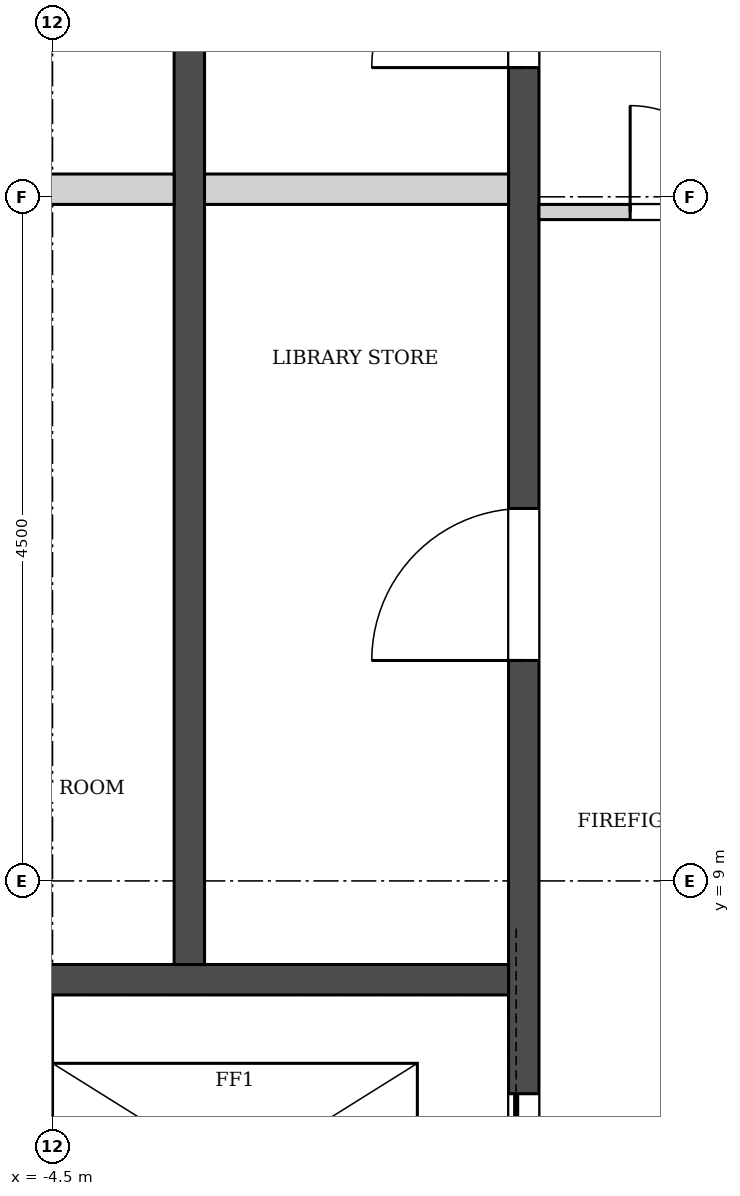
"""IFC4 building model, lengths in metres.
Left out: names, types, materials, properties, quantities, classifications, styles, units other than length and angle.
Written with IfcOpenShell. Run it as: python <this file> out.ifc"""

import sys

from ifc_helpers import new_model, si_unit, direction, frame, frame_2d, origin, place, context, subcontext, project, spatial, rectangle, extrude, element, fill, save


model = new_model("IFC4")
c1 = context("Model", 3, precision=1e-05, world=origin(), true_north=direction((0.0, 1.0)))
c2 = subcontext(c1, "Body", "Model", "MODEL_VIEW")
j1 = project(units=[si_unit("LENGTHUNIT", "METRE"), si_unit("PLANEANGLEUNIT", "RADIAN")], contexts=[c1])
p1 = place(None, origin())
s1 = spatial("IfcSite", under=j1, at=p1, CompositionType="ELEMENT")
p2 = place(p1, origin())
s2 = spatial("IfcBuilding", under=s1, at=p2, CompositionType="ELEMENT")
p3 = place(p2, frame((0.0, 0.0, 335.1)))
s3 = spatial("IfcBuildingStorey", under=s2, at=p3, CompositionType="ELEMENT", Elevation=335.1)
p4 = place(p3, frame((-4.353, 41.372, 0.0), z_axis=(0.0, 0.0, 1.0), x_axis=(-0.500001731347, -0.866024404189, 0.0)))
e1 = element("IfcWall", 1, at=p4, inside=s3, PredefinedType="SOLIDWALL", context=c2, shape_type="SweptSolid", body=[
    extrude(rectangle(XDim=38.87, YDim=0.34, at=frame_2d((19.435, 0.0))), origin(), (0.0, 0.0, 1.0), 3.8),
])
p5 = place(p4, frame((3.653, 0.0, 0.9)))
e2 = element("IfcOpeningElement", 2, at=p5, cuts=e1, PredefinedType="OPENING", context=c2, shape_type="SweptSolid", body=[
    extrude(rectangle(XDim=1.885, YDim=2.6, at=frame_2d((0.942, 1.3))), frame((0.0, 0.18, 0.0), z_axis=(0.0, -1.0, 0.0), x_axis=(1.0, 0.0, 0.0)), (0.0, 0.0, 1.0), 0.36),
])
p6 = place(p4, frame((6.653, 0.0, 0.9)))
e3 = element("IfcOpeningElement", 3, at=p6, cuts=e1, PredefinedType="OPENING", context=c2, shape_type="SweptSolid", body=[
    extrude(rectangle(XDim=1.885, YDim=2.6, at=frame_2d((0.942, 1.3))), frame((0.0, 0.18, 0.0), z_axis=(0.0, -1.0, 0.0), x_axis=(1.0, 0.0, 0.0)), (0.0, 0.0, 1.0), 0.36),
])
p7 = place(p4, frame((9.653, 0.0, 0.9)))
e4 = element("IfcOpeningElement", 4, at=p7, cuts=e1, PredefinedType="OPENING", context=c2, shape_type="SweptSolid", body=[
    extrude(rectangle(XDim=1.885, YDim=2.6, at=frame_2d((0.942, 1.3))), frame((0.0, 0.18, 0.0), z_axis=(0.0, -1.0, 0.0), x_axis=(1.0, 0.0, 0.0)), (0.0, 0.0, 1.0), 0.36),
])
p8 = place(p4, frame((12.653, 0.0, 0.9)))
e5 = element("IfcOpeningElement", 5, at=p8, cuts=e1, PredefinedType="OPENING", context=c2, shape_type="SweptSolid", body=[
    extrude(rectangle(XDim=1.885, YDim=2.6, at=frame_2d((0.942, 1.3))), frame((0.0, 0.18, 0.0), z_axis=(0.0, -1.0, 0.0), x_axis=(1.0, 0.0, 0.0)), (0.0, 0.0, 1.0), 0.36),
])
p9 = place(p4, frame((15.653, 0.0, 0.9)))
e6 = element("IfcOpeningElement", 6, at=p9, cuts=e1, PredefinedType="OPENING", context=c2, shape_type="SweptSolid", body=[
    extrude(rectangle(XDim=1.885, YDim=2.6, at=frame_2d((0.942, 1.3))), frame((0.0, 0.18, 0.0), z_axis=(0.0, -1.0, 0.0), x_axis=(1.0, 0.0, 0.0)), (0.0, 0.0, 1.0), 0.36),
])
p10 = place(p4, frame((18.653, 0.0, 0.9)))
e7 = element("IfcOpeningElement", 7, at=p10, cuts=e1, PredefinedType="OPENING", context=c2, shape_type="SweptSolid", body=[
    extrude(rectangle(XDim=1.885, YDim=2.6, at=frame_2d((0.942, 1.3))), frame((0.0, 0.18, 0.0), z_axis=(0.0, -1.0, 0.0), x_axis=(1.0, 0.0, 0.0)), (0.0, 0.0, 1.0), 0.36),
])
p11 = place(p4, frame((21.653, 0.0, 0.9)))
e8 = element("IfcOpeningElement", 8, at=p11, cuts=e1, PredefinedType="OPENING", context=c2, shape_type="SweptSolid", body=[
    extrude(rectangle(XDim=1.885, YDim=2.6, at=frame_2d((0.942, 1.3))), frame((0.0, 0.18, 0.0), z_axis=(0.0, -1.0, 0.0), x_axis=(1.0, 0.0, 0.0)), (0.0, 0.0, 1.0), 0.36),
])
p12 = place(p4, frame((24.653, 0.0, 0.9)))
e9 = element("IfcOpeningElement", 9, at=p12, cuts=e1, PredefinedType="OPENING", context=c2, shape_type="SweptSolid", body=[
    extrude(rectangle(XDim=1.885, YDim=2.6, at=frame_2d((0.942, 1.3))), frame((0.0, 0.18, 0.0), z_axis=(0.0, -1.0, 0.0), x_axis=(1.0, 0.0, 0.0)), (0.0, 0.0, 1.0), 0.36),
])
p13 = place(p4, frame((27.653, 0.0, 0.9)))
e10 = element("IfcOpeningElement", 10, at=p13, cuts=e1, PredefinedType="OPENING", context=c2, shape_type="SweptSolid", body=[
    extrude(rectangle(XDim=1.885, YDim=2.6, at=frame_2d((0.942, 1.3))), frame((0.0, 0.18, 0.0), z_axis=(0.0, -1.0, 0.0), x_axis=(1.0, 0.0, 0.0)), (0.0, 0.0, 1.0), 0.36),
])
p14 = place(p4, frame((30.653, 0.0, 0.9)))
e11 = element("IfcOpeningElement", 11, at=p14, cuts=e1, PredefinedType="OPENING", context=c2, shape_type="SweptSolid", body=[
    extrude(rectangle(XDim=1.885, YDim=2.6, at=frame_2d((0.942, 1.3))), frame((0.0, 0.18, 0.0), z_axis=(0.0, -1.0, 0.0), x_axis=(1.0, 0.0, 0.0)), (0.0, 0.0, 1.0), 0.36),
])
p15 = place(p4, frame((33.653, 0.0, 0.9)))
e12 = element("IfcOpeningElement", 12, at=p15, cuts=e1, PredefinedType="OPENING", context=c2, shape_type="SweptSolid", body=[
    extrude(rectangle(XDim=1.885, YDim=2.6, at=frame_2d((0.942, 1.3))), frame((0.0, 0.18, 0.0), z_axis=(0.0, -1.0, 0.0), x_axis=(1.0, 0.0, 0.0)), (0.0, 0.0, 1.0), 0.36),
])
p16 = place(p4, frame((1.269, 0.0, 0.9)))
e13 = element("IfcOpeningElement", 13, at=p16, cuts=e1, PredefinedType="OPENING", context=c2, shape_type="SweptSolid", body=[
    extrude(rectangle(XDim=1.115, YDim=2.4, at=frame_2d((0.558, 1.2))), frame((0.0, 0.18, 0.0), z_axis=(0.0, -1.0, 0.0), x_axis=(1.0, 0.0, 0.0)), (0.0, 0.0, 1.0), 0.36),
])
p17 = place(p4, frame((36.646, 0.0, 0.9)))
e14 = element("IfcOpeningElement", 14, at=p17, cuts=e1, PredefinedType="OPENING", context=c2, shape_type="SweptSolid", body=[
    extrude(rectangle(XDim=1.115, YDim=2.4, at=frame_2d((0.558, 1.2))), frame((0.0, 0.18, 0.0), z_axis=(0.0, -1.0, 0.0), x_axis=(1.0, 0.0, 0.0)), (0.0, 0.0, 1.0), 0.36),
])
p18 = place(p3, frame((-3.6, 8.45, -0.4), z_axis=(0.0, 0.0, 1.0), x_axis=(0.0, 1.0, 0.0)))
e15 = element("IfcWall", 15, at=p18, inside=s3, PredefinedType="SOLIDWALL", context=c2, shape_type="SweptSolid", body=[
    extrude(rectangle(XDim=7.8, YDim=0.2, at=frame_2d((3.9, 0.0))), origin(), (0.0, 0.0, 1.0), 4.2),
])
p19 = place(p3, frame((-1.4, 5.85, -0.4), z_axis=(0.0, 0.0, 1.0), x_axis=(0.0, 1.0, 0.0)))
e16 = element("IfcWall", 16, at=p19, inside=s3, PredefinedType="SOLIDWALL", context=c2, shape_type="SweptSolid", body=[
    extrude(rectangle(XDim=11.75, YDim=0.2, at=frame_2d((5.875, 0.0))), origin(), (0.0, 0.0, 1.0), 4.2),
])
p20 = place(p19, frame((0.65, 0.0, 0.4)))
e17 = element("IfcOpeningElement", 17, at=p20, cuts=e16, PredefinedType="OPENING", context=c2, shape_type="SweptSolid", body=[
    extrude(rectangle(XDim=1.1, YDim=2.1, at=frame_2d((0.55, 1.05))), frame((0.0, 0.11, 0.0), z_axis=(0.0, -1.0, 0.0), x_axis=(1.0, 0.0, 0.0)), (0.0, 0.0, 1.0), 0.22),
])
p21 = place(p19, frame((4.6, 0.0, 0.4)))
e18 = element("IfcOpeningElement", 18, at=p21, cuts=e16, PredefinedType="OPENING", context=c2, shape_type="SweptSolid", body=[
    extrude(rectangle(XDim=1.0, YDim=2.1, at=frame_2d((0.5, 1.05))), frame((0.0, 0.11, 0.0), z_axis=(0.0, -1.0, 0.0), x_axis=(1.0, 0.0, 0.0)), (0.0, 0.0, 1.0), 0.22),
])
p22 = place(p19, frame((8.5, 0.0, 0.4)))
e19 = element("IfcOpeningElement", 19, at=p22, cuts=e16, PredefinedType="OPENING", context=c2, shape_type="SweptSolid", body=[
    extrude(rectangle(XDim=1.0, YDim=2.1, at=frame_2d((0.5, 1.05))), frame((0.0, 0.11, 0.0), z_axis=(0.0, -1.0, 0.0), x_axis=(1.0, 0.0, 0.0)), (0.0, 0.0, 1.0), 0.22),
])
p23 = place(p3, frame((-5.7, 8.35, -0.4), z_axis=(0.0, 0.0, 1.0), x_axis=(1.0, 0.0, 0.0)))
e20 = element("IfcWall", 20, at=p23, inside=s3, PredefinedType="SOLIDWALL", context=c2, shape_type="SweptSolid", body=[
    extrude(rectangle(XDim=4.2, YDim=0.2, at=frame_2d((2.1, 0.0))), origin(), (0.0, 0.0, 1.0), 4.2),
])
for number, where, z_axis, x_axis in (
    (21, (-5.7, 13.55, 0.0), (0.0, 0.0, 1.0), (1.0, 0.0, 0.0)),
    (22, (-3.5, 13.55, 0.0), (0.0, 0.0, 1.0), (1.0, 0.0, 0.0)),
):
    element("IfcWall", number, at=place(p3, frame(where, z_axis=z_axis, x_axis=x_axis)), inside=s3, PredefinedType="SOLIDWALL", context=c2, shape_type="SweptSolid", body=[
        extrude(rectangle(XDim=2.0, YDim=0.2, at=frame_2d((1.0, 0.0))), origin(), (0.0, 0.0, 1.0), 3.8),
    ])
p24 = place(p3, frame((-1.3, 13.4, 0.0), z_axis=(0.0, 0.0, 1.0), x_axis=(1.0, 0.0, 0.0)))
e23 = element("IfcWall", 23, at=p24, inside=s3, PredefinedType="PARTITIONING", context=c2, shape_type="SweptSolid", body=[
    extrude(rectangle(XDim=2.6, YDim=0.1, at=frame_2d((1.3, 0.0))), origin(), (0.0, 0.0, 1.0), 3.8),
])
p25 = place(p24, frame((0.6, 0.0, 0.0)))
e24 = element("IfcOpeningElement", 24, at=p25, cuts=e23, PredefinedType="OPENING", context=c2, shape_type="SweptSolid", body=[
    extrude(rectangle(XDim=1.4, YDim=2.1, at=frame_2d((0.7, 1.05))), frame((0.0, 0.06, 0.0), z_axis=(0.0, -1.0, 0.0), x_axis=(1.0, 0.0, 0.0)), (0.0, 0.0, 1.0), 0.12),
])
p26 = place(p20, origin())
e25 = element("IfcDoor", 25, at=p26, inside=s3, OperationType="SLIDING_TO_RIGHT", PredefinedType="DOOR", context=c2, shape_type="SweptSolid", body=[
    extrude(rectangle(XDim=1.1, YDim=2.1, at=frame_2d((0.55, 1.05))), frame((0.0, 0.025, 0.0), z_axis=(0.0, -1.0, 0.0), x_axis=(1.0, 0.0, 0.0)), (0.0, 0.0, 1.0), 0.05),
])
fill(e17, e25)
p27 = place(p21, origin())
e26 = element("IfcDoor", 26, at=p27, inside=s3, OperationType="SINGLE_SWING_LEFT", PredefinedType="DOOR", context=c2, shape_type="SweptSolid", body=[
    extrude(rectangle(XDim=1.0, YDim=2.1, at=frame_2d((0.5, 1.05))), frame((0.0, 0.025, 0.0), z_axis=(0.0, -1.0, 0.0), x_axis=(1.0, 0.0, 0.0)), (0.0, 0.0, 1.0), 0.05),
])
fill(e18, e26)
p28 = place(p22, origin())
e27 = element("IfcDoor", 27, at=p28, inside=s3, OperationType="SINGLE_SWING_LEFT", PredefinedType="DOOR", context=c2, shape_type="SweptSolid", body=[
    extrude(rectangle(XDim=1.0, YDim=2.1, at=frame_2d((0.5, 1.05))), frame((0.0, 0.025, 0.0), z_axis=(0.0, -1.0, 0.0), x_axis=(1.0, 0.0, 0.0)), (0.0, 0.0, 1.0), 0.05),
])
fill(e19, e27)
p29 = place(p25, origin())
e28 = element("IfcDoor", 28, at=p29, inside=s3, OperationType="DOUBLE_DOOR_SINGLE_SWING", PredefinedType="DOOR", context=c2, shape_type="SweptSolid", body=[
    extrude(rectangle(XDim=1.4, YDim=2.1, at=frame_2d((0.7, 1.05))), frame((0.0, 0.025, 0.0), z_axis=(0.0, -1.0, 0.0), x_axis=(1.0, 0.0, 0.0)), (0.0, 0.0, 1.0), 0.05),
])
fill(e24, e28)
save(model, sys.argv[1])
